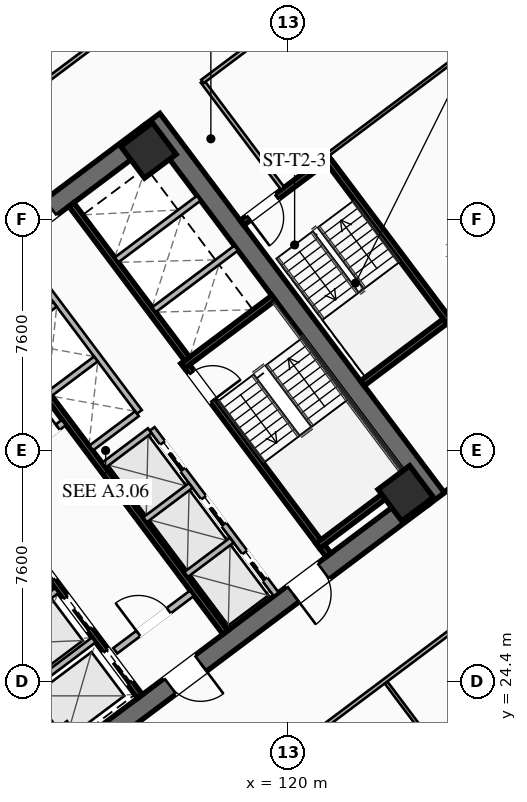
"""IFC4 building model, lengths in metres.
Left out: names, types, materials, properties, quantities, classifications, styles, units other than length and angle.
Written with IfcOpenShell. Run it as: python <this file> out.ifc"""

import sys

from ifc_helpers import new_model, si_unit, direction, frame, frame_2d, origin, origin_2d, place, context, subcontext, project, spatial, rectangle, hollow_rectangle, extrude, element, fill, save


model = new_model("IFC4")
c1 = context("Model", 3, precision=1e-05, world=origin(), true_north=direction((0.0, 1.0)))
c2 = subcontext(c1, "Body", "Model", "MODEL_VIEW")
j1 = project(units=[si_unit("LENGTHUNIT", "METRE"), si_unit("PLANEANGLEUNIT", "RADIAN")], contexts=[c1])
p1 = place(None, origin())
s1 = spatial("IfcSite", under=j1, at=p1, CompositionType="ELEMENT")
p2 = place(p1, origin())
s2 = spatial("IfcBuilding", under=s1, at=p2, CompositionType="ELEMENT")
p3 = place(p2, frame((0.0, 0.0, 88.5)))
s3 = spatial("IfcBuildingStorey", under=s2, at=p3, CompositionType="ELEMENT", Elevation=88.5)
for number, where, z_axis, x_axis in (
    (1, (112.476, 21.107, 0.0), (0.0, 0.0, 1.0), (-0.6, 0.8, 0.0)),
    (2, (115.524, 42.893, 0.0), (0.0, 0.0, 1.0), (0.6, -0.8, 0.0)),
):
    element("IfcWall", number, at=place(p3, frame(where, z_axis=z_axis, x_axis=x_axis)), inside=s3, PredefinedType="SHEAR", context=c2, shape_type="SweptSolid", body=[
        extrude(rectangle(XDim=15.6, YDim=0.65, at=frame_2d((7.8, 0.0))), origin(), (0.0, 0.0, 1.0), 3.55),
    ])
p4 = place(p3, frame((124.429, 30.478, 0.0), z_axis=(0.0, 0.0, 1.0), x_axis=(-0.799998028465, -0.600002628705, 0.0)))
e3 = element("IfcWall", 3, at=p4, inside=s3, PredefinedType="SHEAR", context=c2, shape_type="SweptSolid", body=[
    extrude(rectangle(XDim=14.86, YDim=0.65, at=frame_2d((7.43, 0.0))), origin(), (0.0, 0.0, 1.0), 3.55),
])
p5 = place(p4, frame((9.13, 0.0, 0.0)))
e4 = element("IfcOpeningElement", 4, at=p5, cuts=e3, PredefinedType="OPENING", context=c2, shape_type="SweptSolid", body=[
    extrude(rectangle(XDim=1.25, YDim=2.25, at=frame_2d((0.625, 1.125))), frame((0.0, 0.335, 0.0), z_axis=(0.0, -1.0, 0.0), x_axis=(1.0, 0.0, 0.0)), (0.0, 0.0, 1.0), 0.67),
])
p6 = place(p4, frame((4.08, 0.0, 0.0)))
e5 = element("IfcOpeningElement", 5, at=p6, cuts=e3, PredefinedType="OPENING", context=c2, shape_type="SweptSolid", body=[
    extrude(rectangle(XDim=1.25, YDim=2.25, at=frame_2d((0.625, 1.125))), frame((0.0, 0.335, 0.0), z_axis=(0.0, -1.0, 0.0), x_axis=(1.0, 0.0, 0.0)), (0.0, 0.0, 1.0), 0.67),
])
p7 = place(p3, frame((103.571, 33.522, 0.0), z_axis=(0.0, 0.0, 1.0), x_axis=(0.799998028465, 0.600002628705, 0.0)))
e6 = element("IfcWall", 6, at=p7, inside=s3, PredefinedType="SHEAR", context=c2, shape_type="SweptSolid", body=[
    extrude(rectangle(XDim=14.86, YDim=0.65, at=frame_2d((7.43, 0.0))), origin(), (0.0, 0.0, 1.0), 3.55),
])
p8 = place(p7, frame((4.48, 0.0, 0.0)))
e7 = element("IfcOpeningElement", 7, at=p8, cuts=e6, PredefinedType="OPENING", context=c2, shape_type="SweptSolid", body=[
    extrude(rectangle(XDim=1.25, YDim=2.25, at=frame_2d((0.625, 1.125))), frame((0.0, 0.335, 0.0), z_axis=(0.0, -1.0, 0.0), x_axis=(1.0, 0.0, 0.0)), (0.0, 0.0, 1.0), 0.67),
])
p9 = place(p7, frame((9.53, 0.0, 0.0)))
e8 = element("IfcOpeningElement", 8, at=p9, cuts=e6, PredefinedType="OPENING", context=c2, shape_type="SweptSolid", body=[
    extrude(rectangle(XDim=1.25, YDim=2.25, at=frame_2d((0.625, 1.125))), frame((0.0, 0.335, 0.0), z_axis=(0.0, -1.0, 0.0), x_axis=(1.0, 0.0, 0.0)), (0.0, 0.0, 1.0), 0.67),
])
for number, where, z_axis, x_axis in (
    (9, (123.87, 30.59, 0.0), (0.0, 0.0, 1.0), (0.8, 0.6, 0.0)),
    (10, (115.41, 41.87, 0.0), (0.0, 0.0, 1.0), (0.8, 0.6, 0.0)),
):
    element("IfcColumn", number, at=place(p3, frame(where, z_axis=z_axis, x_axis=x_axis)), inside=s3, PredefinedType="COLUMN", context=c2, shape_type="SweptSolid", body=[
        extrude(hollow_rectangle(XDim=1.3, YDim=1.3, WallThickness=0.05, at=origin_2d()), origin(), (0.0, 0.0, 1.0), 3.35),
    ])
p10 = place(p3, frame((116.56, 34.92, 0.0), z_axis=(0.0, 0.0, 1.0), x_axis=(0.600009827119, -0.799992629566, 0.0)))
e11 = element("IfcWall", 11, at=p10, inside=s3, PredefinedType="SHEAR", context=c2, shape_type="SweptSolid", body=[
    extrude(rectangle(XDim=7.95, YDim=0.2, at=frame_2d((3.975, 0.0))), origin(), (0.0, 0.0, 1.0), 3.35),
])
p11 = place(p10, frame((0.45, 0.0, 0.0)))
e12 = element("IfcOpeningElement", 12, at=p11, cuts=e11, PredefinedType="OPENING", context=c2, shape_type="SweptSolid", body=[
    extrude(rectangle(XDim=1.15, YDim=2.2, at=frame_2d((0.575, 1.1))), frame((0.0, 0.11, 0.0), z_axis=(0.0, -1.0, 0.0), x_axis=(1.0, 0.0, 0.0)), (0.0, 0.0, 1.0), 0.22),
])
for number, where, z_axis, x_axis in (
    (13, (116.54, 34.78, 0.0), (0.0, 0.0, 1.0), (0.8, 0.6, 0.0)),
    (14, (120.98, 28.86, 0.0), (0.0, 0.0, 1.0), (0.8, 0.6, 0.0)),
):
    element("IfcWall", number, at=place(p3, frame(where, z_axis=z_axis, x_axis=x_axis)), inside=s3, PredefinedType="SHEAR", context=c2, shape_type="SweptSolid", body=[
        extrude(rectangle(XDim=3.73, YDim=0.2, at=frame_2d((1.865, 0.0))), origin(), (0.0, 0.0, 1.0), 3.35),
    ])
p12 = place(p3, frame((117.938, 26.016, 0.0), z_axis=(0.0, 0.0, 1.0), x_axis=(-0.600005463273, 0.799995902516, 0.0)))
e15 = element("IfcWall", 15, at=p12, inside=s3, PredefinedType="SHEAR", context=c2, shape_type="SweptSolid", body=[
    extrude(rectangle(XDim=14.3, YDim=0.2, at=frame_2d((7.15, 0.0))), origin(), (0.0, 0.0, 1.0), 3.35),
])
p13 = place(p3, frame((110.104, 31.028, 0.0), z_axis=(0.0, 0.0, 1.0), x_axis=(0.800018601094, 0.59997519774, 0.0)))
e16 = element("IfcWall", 16, at=p13, inside=s3, PredefinedType="SOLIDWALL", context=c2, shape_type="SweptSolid", body=[
    extrude(rectangle(XDim=3.15, YDim=0.22, at=frame_2d((1.575, 0.0))), origin(), (0.0, 0.0, 1.0), 2.703),
])
p14 = place(p13, frame((0.25, 0.0, 0.0)))
e17 = element("IfcOpeningElement", 17, at=p14, cuts=e16, PredefinedType="OPENING", context=c2, shape_type="SweptSolid", body=[
    extrude(rectangle(XDim=0.95, YDim=2.05, at=frame_2d((0.475, 1.025))), frame((0.0, 0.12, 0.0), z_axis=(0.0, -1.0, 0.0), x_axis=(1.0, 0.0, 0.0)), (0.0, 0.0, 1.0), 0.24),
])
p15 = place(p13, frame((1.95, 0.0, 0.0)))
e18 = element("IfcOpeningElement", 18, at=p15, cuts=e16, PredefinedType="OPENING", context=c2, shape_type="SweptSolid", body=[
    extrude(rectangle(XDim=0.95, YDim=2.05, at=frame_2d((0.475, 1.025))), frame((0.0, 0.12, 0.0), z_axis=(0.0, -1.0, 0.0), x_axis=(1.0, 0.0, 0.0)), (0.0, 0.0, 1.0), 0.24),
])
p16 = place(p3, frame((114.316, 25.412, 0.0), z_axis=(0.0, 0.0, 1.0), x_axis=(0.800018601094, 0.59997519774, 0.0)))
e19 = element("IfcWall", 19, at=p16, inside=s3, PredefinedType="SOLIDWALL", context=c2, shape_type="SweptSolid", body=[
    extrude(rectangle(XDim=3.15, YDim=0.22, at=frame_2d((1.575, 0.0))), origin(), (0.0, 0.0, 1.0), 2.703),
])
p17 = place(p16, frame((0.95, 0.0, 0.0)))
e20 = element("IfcOpeningElement", 20, at=p17, cuts=e19, PredefinedType="OPENING", context=c2, shape_type="SweptSolid", body=[
    extrude(rectangle(XDim=1.25, YDim=2.25, at=frame_2d((0.625, 1.125))), frame((0.0, 0.12, 0.0), z_axis=(0.0, -1.0, 0.0), x_axis=(1.0, 0.0, 0.0)), (0.0, 0.0, 1.0), 0.24),
])
p18 = place(p3, frame((115.13, 23.91, 0.0), z_axis=(0.0, 0.0, 1.0), x_axis=(-0.599975393228, 0.800018454488, 0.0)))
e21 = element("IfcWall", 21, at=p18, inside=s3, PredefinedType="SHEAR", context=c2, shape_type="SweptSolid", body=[
    extrude(rectangle(XDim=6.35, YDim=0.2, at=frame_2d((3.175, 0.0))), origin(), (0.0, 0.0, 1.0), 3.35),
])
p19 = place(p18, frame((4.775, 0.0, 0.0)))
e22 = element("IfcOpeningElement", 22, at=p19, cuts=e21, PredefinedType="OPENING", context=c2, shape_type="SweptSolid", body=[
    extrude(rectangle(XDim=1.3, YDim=2.25, at=frame_2d((0.65, 1.125))), frame((0.0, 0.11, 0.0), z_axis=(0.0, -1.0, 0.0), x_axis=(1.0, 0.0, 0.0)), (0.0, 0.0, 1.0), 0.22),
])
p20 = place(p18, frame((2.775, 0.0, 0.0)))
e23 = element("IfcOpeningElement", 23, at=p20, cuts=e21, PredefinedType="OPENING", context=c2, shape_type="SweptSolid", body=[
    extrude(rectangle(XDim=1.3, YDim=2.25, at=frame_2d((0.65, 1.125))), frame((0.0, 0.11, 0.0), z_axis=(0.0, -1.0, 0.0), x_axis=(1.0, 0.0, 0.0)), (0.0, 0.0, 1.0), 0.22),
])
p21 = place(p18, frame((0.575, 0.0, 0.0)))
e24 = element("IfcOpeningElement", 24, at=p21, cuts=e21, PredefinedType="OPENING", context=c2, shape_type="SweptSolid", body=[
    extrude(rectangle(XDim=1.3, YDim=2.25, at=frame_2d((0.65, 1.125))), frame((0.0, 0.11, 0.0), z_axis=(0.0, -1.0, 0.0), x_axis=(1.0, 0.0, 0.0)), (0.0, 0.0, 1.0), 0.22),
])
for number, where, z_axis, x_axis in (
    (25, (110.906, 23.742, 0.0), (0.0, 0.0, 1.0), (0.8, 0.6, 0.0)),
    (26, (109.688, 25.366, 0.0), (0.0, 0.0, 1.0), (0.8, 0.6, 0.0)),
):
    element("IfcWall", number, at=place(p3, frame(where, z_axis=z_axis, x_axis=x_axis)), inside=s3, PredefinedType="SOLIDWALL", context=c2, shape_type="SweptSolid", body=[
        extrude(rectangle(XDim=3.38, YDim=0.2, at=frame_2d((1.69, 0.0))), origin(), (0.0, 0.0, 1.0), 3.35),
    ])
p22 = place(p3, frame((112.87, 40.09, 0.0), z_axis=(0.0, 0.0, 1.0), x_axis=(0.599975393228, -0.800018454488, 0.0)))
e27 = element("IfcWall", 27, at=p22, inside=s3, PredefinedType="SHEAR", context=c2, shape_type="SweptSolid", body=[
    extrude(rectangle(XDim=6.35, YDim=0.2, at=frame_2d((3.175, 0.0))), origin(), (0.0, 0.0, 1.0), 3.35),
])
for number, where, z_axis, x_axis in (
    (28, (115.59, 36.63, 0.0), (0.0, 0.0, 1.0), (0.8, 0.6, 0.0)),
    (29, (114.36, 38.27, 0.0), (0.0, 0.0, 1.0), (0.8, 0.6, 0.0)),
):
    element("IfcWall", number, at=place(p3, frame(where, z_axis=z_axis, x_axis=x_axis)), inside=s3, PredefinedType="SOLIDWALL", context=c2, shape_type="SweptSolid", body=[
        extrude(rectangle(XDim=3.38, YDim=0.2, at=frame_2d((1.69, 0.0))), origin(), (0.0, 0.0, 1.0), 3.35),
    ])
p23 = place(p3, frame((119.61, 27.27, 0.0), z_axis=(0.0, 0.0, 1.0), x_axis=(-0.600011488909, 0.79999138319, 0.0)))
e30 = element("IfcWall", 30, at=p23, inside=s3, PredefinedType="SOLIDWALL", context=c2, shape_type="SweptSolid", body=[
    extrude(rectangle(XDim=6.8, YDim=0.2, at=frame_2d((3.4, 0.0))), origin(), (0.0, 0.0, 1.0), 3.35),
])
p24 = place(p23, frame((0.625, 0.0, 0.0)))
e31 = element("IfcOpeningElement", 31, at=p24, cuts=e30, PredefinedType="OPENING", context=c2, shape_type="SweptSolid", body=[
    extrude(rectangle(XDim=1.1, YDim=2.2, at=frame_2d((0.55, 1.1))), frame((0.0, 0.11, 0.0), z_axis=(0.0, -1.0, 0.0), x_axis=(1.0, 0.0, 0.0)), (0.0, 0.0, 1.0), 0.22),
])
p25 = place(p23, frame((2.875, 0.0, 0.0)))
e32 = element("IfcOpeningElement", 32, at=p25, cuts=e30, PredefinedType="OPENING", context=c2, shape_type="SweptSolid", body=[
    extrude(rectangle(XDim=1.1, YDim=2.2, at=frame_2d((0.55, 1.1))), frame((0.0, 0.11, 0.0), z_axis=(0.0, -1.0, 0.0), x_axis=(1.0, 0.0, 0.0)), (0.0, 0.0, 1.0), 0.22),
])
p26 = place(p23, frame((5.125, 0.0, 0.0)))
e33 = element("IfcOpeningElement", 33, at=p26, cuts=e30, PredefinedType="OPENING", context=c2, shape_type="SweptSolid", body=[
    extrude(rectangle(XDim=1.1, YDim=2.2, at=frame_2d((0.55, 1.1))), frame((0.0, 0.11, 0.0), z_axis=(0.0, -1.0, 0.0), x_axis=(1.0, 0.0, 0.0)), (0.0, 0.0, 1.0), 0.22),
])
p27 = place(p3, frame((116.646, 27.922, 0.0), z_axis=(0.0, 0.0, 1.0), x_axis=(0.8, 0.6, 0.0)))
e34 = element("IfcWall", 34, at=p27, inside=s3, PredefinedType="SOLIDWALL", context=c2, shape_type="SweptSolid", body=[
    extrude(rectangle(XDim=1.88, YDim=0.2, at=frame_2d((0.94, 0.0))), origin(), (0.0, 0.0, 1.0), 3.35),
])
p28 = place(p3, frame((115.296, 29.722, 0.0), z_axis=(0.0, 0.0, 1.0), x_axis=(0.799984418148, 0.600020775241, 0.0)))
e35 = element("IfcWall", 35, at=p28, inside=s3, PredefinedType="SOLIDWALL", context=c2, shape_type="SweptSolid", body=[
    extrude(rectangle(XDim=1.88, YDim=0.2, at=frame_2d((0.94, 0.0))), origin(), (0.0, 0.0, 1.0), 3.35),
])
p29 = place(p3, frame((113.946, 31.522, 0.0), z_axis=(0.0, 0.0, 1.0), x_axis=(0.8, 0.6, 0.0)))
e36 = element("IfcWall", 36, at=p29, inside=s3, PredefinedType="SOLIDWALL", context=c2, shape_type="SweptSolid", body=[
    extrude(rectangle(XDim=1.88, YDim=0.2, at=frame_2d((0.94, 0.0))), origin(), (0.0, 0.0, 1.0), 3.35),
])
p30 = place(p3, frame((115.11, 33.27, 0.0), z_axis=(0.0, 0.0, 1.0), x_axis=(-0.600011488909, 0.79999138319, 0.0)))
e37 = element("IfcWall", 37, at=p30, inside=s3, PredefinedType="SOLIDWALL", context=c2, shape_type="SweptSolid", body=[
    extrude(rectangle(XDim=6.8, YDim=0.2, at=frame_2d((3.4, 0.0))), origin(), (0.0, 0.0, 1.0), 3.35),
])
p31 = place(p3, frame((113.526, 32.082, 0.0), z_axis=(0.0, 0.0, 1.0), x_axis=(0.800046745961, 0.599937666993, 0.0)))
e38 = element("IfcWall", 38, at=p31, inside=s3, PredefinedType="SOLIDWALL", context=c2, shape_type="SweptSolid", body=[
    extrude(rectangle(XDim=1.88, YDim=0.2, at=frame_2d((0.94, 0.0))), origin(), (0.0, 0.0, 1.0), 3.35),
])
p32 = place(p3, frame((112.176, 33.882, 0.0), z_axis=(0.0, 0.0, 1.0), x_axis=(0.8, 0.6, 0.0)))
e39 = element("IfcWall", 39, at=p32, inside=s3, PredefinedType="SOLIDWALL", context=c2, shape_type="SweptSolid", body=[
    extrude(rectangle(XDim=1.88, YDim=0.2, at=frame_2d((0.94, 0.0))), origin(), (0.0, 0.0, 1.0), 3.35),
])
p33 = place(p3, frame((110.826, 35.682, 0.0), z_axis=(0.0, 0.0, 1.0), x_axis=(0.799984418148, 0.600020775241, 0.0)))
e40 = element("IfcWall", 40, at=p33, inside=s3, PredefinedType="SOLIDWALL", context=c2, shape_type="SweptSolid", body=[
    extrude(rectangle(XDim=1.88, YDim=0.2, at=frame_2d((0.94, 0.0))), origin(), (0.0, 0.0, 1.0), 3.35),
])
p34 = place(p3, frame((125.304, 36.228, 0.0), z_axis=(0.0, 0.0, 1.0), x_axis=(-0.59998851072, 0.800008616831, 0.0)))
e41 = element("IfcWall", 41, at=p34, inside=s3, PredefinedType="SHEAR", context=c2, shape_type="SweptSolid", body=[
    extrude(rectangle(XDim=6.8, YDim=0.2, at=frame_2d((3.4, 0.0))), origin(), (0.0, 0.0, 1.0), 3.35),
])
p35 = place(p3, frame((121.204, 41.528, 0.0), z_axis=(0.0, 0.0, 1.0), x_axis=(-0.800017232136, -0.599977023131, 0.0)))
e42 = element("IfcWall", 42, at=p35, inside=s3, PredefinedType="SHEAR", context=c2, shape_type="SweptSolid", body=[
    extrude(rectangle(XDim=3.4, YDim=0.2, at=frame_2d((1.7, 0.0))), origin(), (0.0, 0.0, 1.0), 3.35),
])
p36 = place(p35, frame((1.975, 0.0, 0.0)))
e43 = element("IfcOpeningElement", 43, at=p36, cuts=e42, PredefinedType="OPENING", context=c2, shape_type="SweptSolid", body=[
    extrude(rectangle(XDim=1.15, YDim=2.2, at=frame_2d((0.575, 1.1))), frame((0.0, 0.11, 0.0), z_axis=(0.0, -1.0, 0.0), x_axis=(1.0, 0.0, 0.0)), (0.0, 0.0, 1.0), 0.22),
])
p37 = place(p3, frame((122.444, 34.208, 0.0), z_axis=(0.0, 0.0, 1.0), x_axis=(0.79999138319, 0.600011488909, 0.0)))
e44 = element("IfcWall", 44, at=p37, inside=s3, PredefinedType="SHEAR", context=c2, shape_type="SweptSolid", body=[
    extrude(rectangle(XDim=3.4, YDim=0.2, at=frame_2d((1.7, 0.0))), origin(), (0.0, 0.0, 1.0), 3.35),
])
p38 = place(p3, frame((119.824, 40.618, 0.0), z_axis=(0.0, 0.0, 1.0), x_axis=(-0.599982243973, 0.800013316712, 0.0)))
e45 = element("IfcWall", 45, at=p38, inside=s3, PredefinedType="PARTITIONING", context=c2, shape_type="SweptSolid", body=[
    extrude(rectangle(XDim=4.4, YDim=0.135, at=frame_2d((2.2, 0.0))), origin(), (0.0, 0.0, 1.0), 2.703),
])
p39 = place(p3, frame((98.516, 34.012, 0.0), z_axis=(0.0, 0.0, 1.0), x_axis=(0.8, 0.6, 0.0)))
e46 = element("IfcWall", 46, at=p39, inside=s3, PredefinedType="PARTITIONING", context=c2, shape_type="SweptSolid", body=[
    extrude(rectangle(XDim=28.23, YDim=0.135, at=frame_2d((14.115, 0.0))), origin(), (0.0, 0.0, 1.0), 2.703),
])
p40 = place(p39, frame((0.3, 0.0, 0.0)))
e47 = element("IfcOpeningElement", 47, at=p40, cuts=e46, PredefinedType="OPENING", context=c2, shape_type="SweptSolid", body=[
    extrude(rectangle(XDim=0.95, YDim=2.05, at=frame_2d((0.475, 1.025))), frame((0.0, 0.077, 0.0), z_axis=(0.0, -1.0, 0.0), x_axis=(1.0, 0.0, 0.0)), (0.0, 0.0, 1.0), 0.155),
])
p41 = place(p39, frame((26.98, 0.0, 0.0)))
e48 = element("IfcOpeningElement", 48, at=p41, cuts=e46, PredefinedType="OPENING", context=c2, shape_type="SweptSolid", body=[
    extrude(rectangle(XDim=0.95, YDim=2.05, at=frame_2d((0.475, 1.025))), frame((0.0, 0.077, 0.0), z_axis=(0.0, -1.0, 0.0), x_axis=(1.0, 0.0, 0.0)), (0.0, 0.0, 1.0), 0.155),
])
p42 = place(p3, frame((134.582, 32.974, 0.0), z_axis=(0.0, 0.0, 1.0), x_axis=(-0.799995848831, -0.600005534853, 0.0)))
e49 = element("IfcWall", 49, at=p42, inside=s3, PredefinedType="PARTITIONING", context=c2, shape_type="SweptSolid", body=[
    extrude(rectangle(XDim=28.23, YDim=0.135, at=frame_2d((14.115, 0.0))), origin(), (0.0, 0.0, 1.0), 2.703),
])
p43 = place(p42, frame((26.9, 0.0, 0.0)))
e50 = element("IfcOpeningElement", 50, at=p43, cuts=e49, PredefinedType="OPENING", context=c2, shape_type="SweptSolid", body=[
    extrude(rectangle(XDim=0.95, YDim=2.05, at=frame_2d((0.475, 1.025))), frame((0.0, 0.077, 0.0), z_axis=(0.0, -1.0, 0.0), x_axis=(1.0, 0.0, 0.0)), (0.0, 0.0, 1.0), 0.155),
])
p44 = place(p42, frame((0.38, 0.0, 0.0)))
e51 = element("IfcOpeningElement", 51, at=p44, cuts=e49, PredefinedType="OPENING", context=c2, shape_type="SweptSolid", body=[
    extrude(rectangle(XDim=0.95, YDim=2.05, at=frame_2d((0.475, 1.025))), frame((0.0, 0.077, 0.0), z_axis=(0.0, -1.0, 0.0), x_axis=(1.0, 0.0, 0.0)), (0.0, 0.0, 1.0), 0.155),
])
p45 = place(p3, frame((128.168, 17.776, 0.0), z_axis=(0.0, 0.0, 1.0), x_axis=(-0.599985761145, 0.800010678943, 0.0)))
e52 = element("IfcWall", 52, at=p45, inside=s3, PredefinedType="PARTITIONING", context=c2, shape_type="SweptSolid", body=[
    extrude(rectangle(XDim=8.23, YDim=0.11, at=frame_2d((4.115, 0.0))), origin(), (0.0, 0.0, 1.0), 2.703),
])
p46 = place(p3, frame((125.224, 50.168, 0.0), z_axis=(0.0, 0.0, 1.0), x_axis=(-0.8, -0.6, 0.0)))
e53 = element("IfcWall", 53, at=p46, inside=s3, PredefinedType="PARTITIONING", context=c2, shape_type="SweptSolid", body=[
    extrude(rectangle(XDim=10.05, YDim=0.135, at=frame_2d((5.025, 0.0))), origin(), (0.0, 0.0, 1.0), 2.703),
])
p47 = place(p46, frame((4.9, 0.0, 0.0)))
e54 = element("IfcOpeningElement", 54, at=p47, cuts=e53, PredefinedType="OPENING", context=c2, shape_type="SweptSolid", body=[
    extrude(rectangle(XDim=0.95, YDim=2.05, at=frame_2d((0.475, 1.025))), frame((0.0, 0.077, 0.0), z_axis=(0.0, -1.0, 0.0), x_axis=(1.0, 0.0, 0.0)), (0.0, 0.0, 1.0), 0.155),
])
p48 = place(p3, frame((125.208, 30.656, 0.0), z_axis=(0.0, 0.0, 1.0), x_axis=(0.8, 0.6, 0.0)))
e55 = element("IfcWall", 55, at=p48, inside=s3, PredefinedType="PARTITIONING", context=c2, shape_type="SweptSolid", body=[
    extrude(rectangle(XDim=11.72, YDim=0.135, at=frame_2d((5.86, 0.0))), origin(), (0.0, 0.0, 1.0), 2.703),
])
p49 = place(p48, frame((2.045, 0.0, 0.0)))
e56 = element("IfcOpeningElement", 56, at=p49, cuts=e55, PredefinedType="OPENING", context=c2, shape_type="SweptSolid", body=[
    extrude(rectangle(XDim=0.95, YDim=2.05, at=frame_2d((0.475, 1.025))), frame((0.0, 0.077, 0.0), z_axis=(0.0, -1.0, 0.0), x_axis=(1.0, 0.0, 0.0)), (0.0, 0.0, 1.0), 0.155),
])
p50 = place(p3, frame((127.864, 46.648, 0.0), z_axis=(0.0, 0.0, 1.0), x_axis=(-0.800007145523, -0.599990472518, 0.0)))
e57 = element("IfcWall", 57, at=p50, inside=s3, PredefinedType="PARTITIONING", context=c2, shape_type="SweptSolid", body=[
    extrude(rectangle(XDim=8.2, YDim=0.11, at=frame_2d((4.1, 0.0))), origin(), (0.0, 0.0, 1.0), 2.703),
])
p51 = place(p5, origin())
e58 = element("IfcDoor", 58, at=p51, inside=s3, OperationType="SINGLE_SWING_LEFT", PredefinedType="DOOR", context=c2, shape_type="SweptSolid", body=[
    extrude(rectangle(XDim=1.25, YDim=2.25, at=frame_2d((0.625, 1.125))), frame((0.0, 0.025, 0.0), z_axis=(0.0, -1.0, 0.0), x_axis=(1.0, 0.0, 0.0)), (0.0, 0.0, 1.0), 0.05),
])
fill(e4, e58)
p52 = place(p6, origin())
e59 = element("IfcDoor", 59, at=p52, inside=s3, OperationType="SINGLE_SWING_RIGHT", PredefinedType="DOOR", context=c2, shape_type="SweptSolid", body=[
    extrude(rectangle(XDim=1.25, YDim=2.25, at=frame_2d((0.625, 1.125))), frame((0.0, 0.025, 0.0), z_axis=(0.0, -1.0, 0.0), x_axis=(1.0, 0.0, 0.0)), (0.0, 0.0, 1.0), 0.05),
])
fill(e5, e59)
p53 = place(p11, origin())
e60 = element("IfcDoor", 60, at=p53, inside=s3, OperationType="SINGLE_SWING_RIGHT", PredefinedType="DOOR", context=c2, shape_type="SweptSolid", body=[
    extrude(rectangle(XDim=1.15, YDim=2.2, at=frame_2d((0.575, 1.1))), frame((0.0, 0.025, 0.0), z_axis=(0.0, -1.0, 0.0), x_axis=(1.0, 0.0, 0.0)), (0.0, 0.0, 1.0), 0.05),
])
fill(e12, e60)
p54 = place(p17, origin())
e61 = element("IfcDoor", 61, at=p54, inside=s3, OperationType="SINGLE_SWING_LEFT", PredefinedType="DOOR", context=c2, shape_type="SweptSolid", body=[
    extrude(rectangle(XDim=1.25, YDim=2.25, at=frame_2d((0.625, 1.125))), frame((0.0, 0.025, 0.0), z_axis=(0.0, -1.0, 0.0), x_axis=(1.0, 0.0, 0.0)), (0.0, 0.0, 1.0), 0.05),
])
fill(e20, e61)
p55 = place(p15, origin())
e62 = element("IfcDoor", 62, at=p55, inside=s3, OperationType="SINGLE_SWING_RIGHT", PredefinedType="DOOR", context=c2, shape_type="SweptSolid", body=[
    extrude(rectangle(XDim=0.95, YDim=2.05, at=frame_2d((0.475, 1.025))), frame((0.0, 0.025, 0.0), z_axis=(0.0, -1.0, 0.0), x_axis=(1.0, 0.0, 0.0)), (0.0, 0.0, 1.0), 0.05),
])
fill(e18, e62)
p56 = place(p36, origin())
e63 = element("IfcDoor", 63, at=p56, inside=s3, OperationType="SINGLE_SWING_RIGHT", PredefinedType="DOOR", context=c2, shape_type="SweptSolid", body=[
    extrude(rectangle(XDim=1.15, YDim=2.2, at=frame_2d((0.575, 1.1))), frame((0.0, 0.025, 0.0), z_axis=(0.0, -1.0, 0.0), x_axis=(1.0, 0.0, 0.0)), (0.0, 0.0, 1.0), 0.05),
])
fill(e43, e63)
p57 = place(p19, origin())
e64 = element("IfcDoor", 64, at=p57, inside=s3, OperationType="SLIDING_TO_LEFT", PredefinedType="DOOR", context=c2, shape_type="SweptSolid", body=[
    extrude(rectangle(XDim=1.3, YDim=2.25, at=frame_2d((0.65, 1.125))), frame((0.0, 0.025, 0.0), z_axis=(0.0, -1.0, 0.0), x_axis=(1.0, 0.0, 0.0)), (0.0, 0.0, 1.0), 0.05),
])
fill(e22, e64)
p58 = place(p20, origin())
e65 = element("IfcDoor", 65, at=p58, inside=s3, OperationType="SLIDING_TO_LEFT", PredefinedType="DOOR", context=c2, shape_type="SweptSolid", body=[
    extrude(rectangle(XDim=1.3, YDim=2.25, at=frame_2d((0.65, 1.125))), frame((0.0, 0.025, 0.0), z_axis=(0.0, -1.0, 0.0), x_axis=(1.0, 0.0, 0.0)), (0.0, 0.0, 1.0), 0.05),
])
fill(e23, e65)
p59 = place(p21, origin())
e66 = element("IfcDoor", 66, at=p59, inside=s3, OperationType="SLIDING_TO_LEFT", PredefinedType="DOOR", context=c2, shape_type="SweptSolid", body=[
    extrude(rectangle(XDim=1.3, YDim=2.25, at=frame_2d((0.65, 1.125))), frame((0.0, 0.025, 0.0), z_axis=(0.0, -1.0, 0.0), x_axis=(1.0, 0.0, 0.0)), (0.0, 0.0, 1.0), 0.05),
])
fill(e24, e66)
p60 = place(p24, origin())
e67 = element("IfcDoor", 67, at=p60, inside=s3, OperationType="SLIDING_TO_LEFT", PredefinedType="DOOR", context=c2, shape_type="SweptSolid", body=[
    extrude(rectangle(XDim=1.1, YDim=2.2, at=frame_2d((0.55, 1.1))), frame((0.0, 0.025, 0.0), z_axis=(0.0, -1.0, 0.0), x_axis=(1.0, 0.0, 0.0)), (0.0, 0.0, 1.0), 0.05),
])
fill(e31, e67)
p61 = place(p25, origin())
e68 = element("IfcDoor", 68, at=p61, inside=s3, OperationType="SLIDING_TO_LEFT", PredefinedType="DOOR", context=c2, shape_type="SweptSolid", body=[
    extrude(rectangle(XDim=1.1, YDim=2.2, at=frame_2d((0.55, 1.1))), frame((0.0, 0.025, 0.0), z_axis=(0.0, -1.0, 0.0), x_axis=(1.0, 0.0, 0.0)), (0.0, 0.0, 1.0), 0.05),
])
fill(e32, e68)
p62 = place(p26, origin())
e69 = element("IfcDoor", 69, at=p62, inside=s3, OperationType="SLIDING_TO_LEFT", PredefinedType="DOOR", context=c2, shape_type="SweptSolid", body=[
    extrude(rectangle(XDim=1.1, YDim=2.2, at=frame_2d((0.55, 1.1))), frame((0.0, 0.025, 0.0), z_axis=(0.0, -1.0, 0.0), x_axis=(1.0, 0.0, 0.0)), (0.0, 0.0, 1.0), 0.05),
])
fill(e33, e69)
save(model, sys.argv[1])
